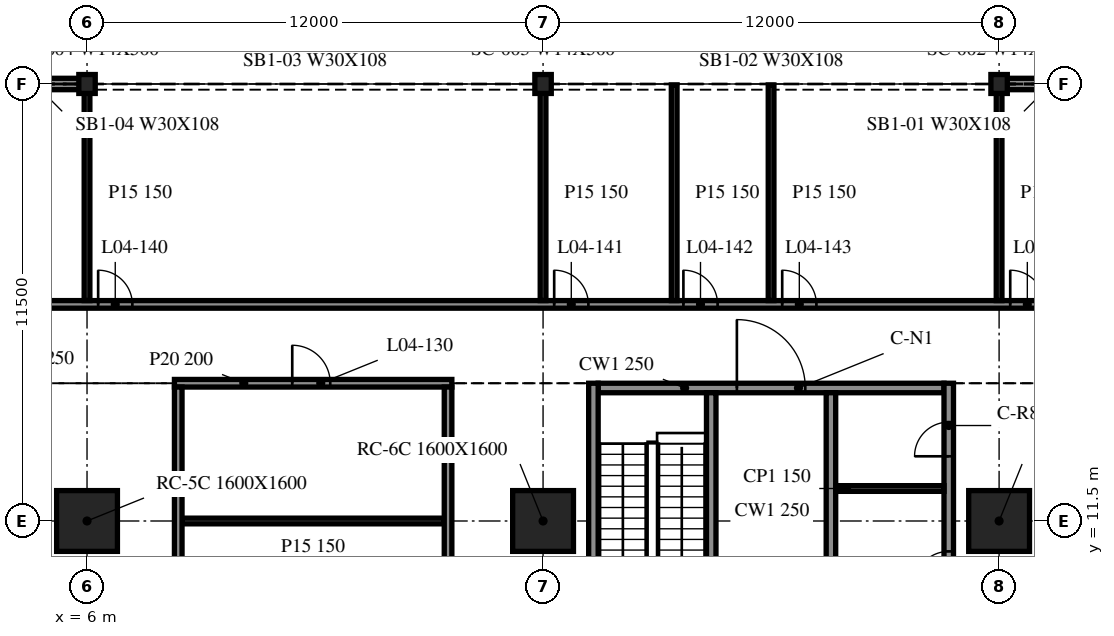
"""IFC4 building model, lengths in metres.
Left out: names, types, materials, properties, quantities, classifications, styles, units other than length and angle.
Written with IfcOpenShell. Run it as: python <this file> out.ifc"""

import sys

from ifc_helpers import new_model, si_unit, direction, frame, frame_2d, origin, origin_2d, place, context, subcontext, project, spatial, rectangle, i_section, extrude, element, fill, save


model = new_model("IFC4")
c1 = context("Model", 3, precision=1e-05, world=origin(), true_north=direction((0.0, 1.0)))
c2 = subcontext(c1, "Body", "Model", "MODEL_VIEW")
j1 = project(units=[si_unit("LENGTHUNIT", "METRE"), si_unit("PLANEANGLEUNIT", "RADIAN")], contexts=[c1])
p1 = place(None, origin())
s1 = spatial("IfcSite", under=j1, at=p1, CompositionType="ELEMENT")
p2 = place(p1, origin())
s2 = spatial("IfcBuilding", under=s1, at=p2, CompositionType="ELEMENT")
p3 = place(p2, frame((0.0, 0.0, 20.1)))
s3 = spatial("IfcBuildingStorey", under=s2, at=p3, CompositionType="ELEMENT", Elevation=20.1)
for number, where, z_axis, x_axis in (
    (1, (6.0, 11.5, -0.34), (0.0, 0.0, 1.0), (1.0, 0.0, 0.0)),
    (2, (18.0, 11.5, -0.34), (0.0, 0.0, 1.0), (1.0, 0.0, 0.0)),
    (3, (30.0, 11.5, -0.34), (0.0, 0.0, 1.0), (1.0, 0.0, 0.0)),
):
    element("IfcColumn", number, at=place(p3, frame(where, z_axis=z_axis, x_axis=x_axis)), inside=s3, PredefinedType="COLUMN", context=c2, shape_type="SweptSolid", body=[
        extrude(rectangle(XDim=1.6, YDim=1.6, at=origin_2d()), origin(), (0.0, 0.0, 1.0), 4.3),
    ])
for number, where, z_axis, x_axis in (
    (4, (30.0, 23.0, -0.34), (0.0, 0.0, 1.0), (1.0, 0.0, 0.0)),
    (5, (18.0, 23.0, -0.34), (0.0, 0.0, 1.0), (1.0, 0.0, 0.0)),
    (6, (6.0, 23.0, -0.34), (0.0, 0.0, 1.0), (1.0, 0.0, 0.0)),
):
    element("IfcColumn", number, at=place(p3, frame(where, z_axis=z_axis, x_axis=x_axis)), inside=s3, PredefinedType="COLUMN", context=c2, shape_type="SweptSolid", body=[
        extrude(i_section(OverallWidth=0.432, OverallDepth=0.498, WebThickness=0.056, FlangeThickness=0.089, at=origin_2d()), origin(), (0.0, 0.0, 1.0), 4.3),
    ])
for number, where, z_axis, x_axis in (
    (7, (41.972, 23.0, 0.0), (0.0, 0.0, 1.0), (-1.0, 0.0, 0.0)),
    (8, (5.972, 23.0, 0.0), (0.0, 0.0, 1.0), (-1.0, 0.0, 0.0)),
):
    element("IfcWall", number, at=place(p3, frame(where, z_axis=z_axis, x_axis=x_axis)), inside=s3, PredefinedType="NOTDEFINED", context=c2, shape_type="SweptSolid", body=[
        extrude(rectangle(XDim=11.944, YDim=0.3, at=frame_2d((5.972, 0.0))), origin(), (0.0, 0.0, 1.0), 3.203),
    ])
p4 = place(p3, frame((19.325, 15.125, 0.0), z_axis=(0.0, 0.0, 1.0), x_axis=(0.0, -1.0, 0.0)))
e9 = element("IfcWall", 9, at=p4, inside=s3, PredefinedType="SOLIDWALL", context=c2, shape_type="SweptSolid", body=[
    extrude(rectangle(XDim=24.25, YDim=0.25, at=frame_2d((12.125, 0.0))), origin(), (0.0, 0.0, 1.0), 3.96),
])
p5 = place(p3, frame((28.675, -9.125, 0.0), z_axis=(0.0, 0.0, 1.0), x_axis=(0.0, 1.0, 0.0)))
e10 = element("IfcWall", 10, at=p5, inside=s3, PredefinedType="SOLIDWALL", context=c2, shape_type="SweptSolid", body=[
    extrude(rectangle(XDim=24.25, YDim=0.25, at=frame_2d((12.125, 0.0))), origin(), (0.0, 0.0, 1.0), 3.96),
])
p6 = place(p5, frame((13.075, 0.0, 0.0)))
e11 = element("IfcOpeningElement", 11, at=p6, cuts=e10, PredefinedType="OPENING", context=c2, shape_type="SweptSolid", body=[
    extrude(rectangle(XDim=0.9, YDim=2.1, at=frame_2d((0.45, 1.05))), frame((0.0, 0.135, 0.0), z_axis=(0.0, -1.0, 0.0), x_axis=(1.0, 0.0, 0.0)), (0.0, 0.0, 1.0), 0.27),
])
p7 = place(p5, frame((15.775, 0.0, 0.0)))
e12 = element("IfcOpeningElement", 12, at=p7, cuts=e10, PredefinedType="OPENING", context=c2, shape_type="SweptSolid", body=[
    extrude(rectangle(XDim=0.9, YDim=2.1, at=frame_2d((0.45, 1.05))), frame((0.0, 0.135, 0.0), z_axis=(0.0, -1.0, 0.0), x_axis=(1.0, 0.0, 0.0)), (0.0, 0.0, 1.0), 0.27),
])
p8 = place(p5, frame((18.925, 0.0, 0.0)))
e13 = element("IfcOpeningElement", 13, at=p8, cuts=e10, PredefinedType="OPENING", context=c2, shape_type="SweptSolid", body=[
    extrude(rectangle(XDim=0.9, YDim=2.1, at=frame_2d((0.45, 1.05))), frame((0.0, 0.135, 0.0), z_axis=(0.0, -1.0, 0.0), x_axis=(1.0, 0.0, 0.0)), (0.0, 0.0, 1.0), 0.27),
])
p9 = place(p5, frame((22.327, 0.0, 0.0)))
e14 = element("IfcOpeningElement", 14, at=p9, cuts=e10, PredefinedType="OPENING", context=c2, shape_type="SweptSolid", body=[
    extrude(rectangle(XDim=0.9, YDim=2.1, at=frame_2d((0.45, 1.05))), frame((0.0, 0.135, 0.0), z_axis=(0.0, -1.0, 0.0), x_axis=(1.0, 0.0, 0.0)), (0.0, 0.0, 1.0), 0.27),
])
p10 = place(p3, frame((19.45, 15.0, 0.0), z_axis=(0.0, 0.0, 1.0), x_axis=(1.0, 0.0, 0.0)))
e15 = element("IfcWall", 15, at=p10, inside=s3, PredefinedType="SOLIDWALL", context=c2, shape_type="SweptSolid", body=[
    extrude(rectangle(XDim=9.1, YDim=0.25, at=frame_2d((4.55, 0.0))), origin(), (0.0, 0.0, 1.0), 3.96),
])
p11 = place(p10, frame((3.65, 0.0, 0.0)))
e16 = element("IfcOpeningElement", 16, at=p11, cuts=e15, PredefinedType="OPENING", context=c2, shape_type="SweptSolid", body=[
    extrude(rectangle(XDim=1.8, YDim=2.1, at=frame_2d((0.9, 1.05))), frame((0.0, 0.135, 0.0), z_axis=(0.0, -1.0, 0.0), x_axis=(1.0, 0.0, 0.0)), (0.0, 0.0, 1.0), 0.27),
])
p12 = place(p3, frame((22.425, 14.875, 0.0), z_axis=(0.0, 0.0, 1.0), x_axis=(0.0, -1.0, 0.0)))
e17 = element("IfcWall", 17, at=p12, inside=s3, PredefinedType="SOLIDWALL", context=c2, shape_type="SweptSolid", body=[
    extrude(rectangle(XDim=6.25, YDim=0.25, at=frame_2d((3.125, 0.0))), origin(), (0.0, 0.0, 1.0), 3.96),
])
p13 = place(p12, frame((4.85, 0.0, 0.0)))
e18 = element("IfcOpeningElement", 18, at=p13, cuts=e17, PredefinedType="OPENING", context=c2, shape_type="SweptSolid", body=[
    extrude(rectangle(XDim=1.0, YDim=2.1, at=frame_2d((0.5, 1.05))), frame((0.0, 0.135, 0.0), z_axis=(0.0, -1.0, 0.0), x_axis=(1.0, 0.0, 0.0)), (0.0, 0.0, 1.0), 0.27),
])
p14 = place(p3, frame((25.575, 14.875, 0.0), z_axis=(0.0, 0.0, 1.0), x_axis=(0.0, -1.0, 0.0)))
e19 = element("IfcWall", 19, at=p14, inside=s3, PredefinedType="SOLIDWALL", context=c2, shape_type="SweptSolid", body=[
    extrude(rectangle(XDim=17.5, YDim=0.25, at=frame_2d((8.75, 0.0))), origin(), (0.0, 0.0, 1.0), 3.96),
])
p15 = place(p14, frame((15.45, 0.0, 0.0)))
e20 = element("IfcOpeningElement", 20, at=p15, cuts=e19, PredefinedType="OPENING", context=c2, shape_type="SweptSolid", body=[
    extrude(rectangle(XDim=1.1, YDim=2.1, at=frame_2d((0.55, 1.05))), frame((0.0, 0.135, 0.0), z_axis=(0.0, -1.0, 0.0), x_axis=(1.0, 0.0, 0.0)), (0.0, 0.0, 1.0), 0.27),
])
p16 = place(p14, frame((12.8, 0.0, 0.0)))
e21 = element("IfcOpeningElement", 21, at=p16, cuts=e19, PredefinedType="OPENING", context=c2, shape_type="SweptSolid", body=[
    extrude(rectangle(XDim=0.9, YDim=2.1, at=frame_2d((0.45, 1.05))), frame((0.0, 0.135, 0.0), z_axis=(0.0, -1.0, 0.0), x_axis=(1.0, 0.0, 0.0)), (0.0, 0.0, 1.0), 0.27),
])
p17 = place(p3, frame((25.7, 12.355, 0.0), z_axis=(0.0, 0.0, 1.0), x_axis=(1.0, 0.0, 0.0)))
e22 = element("IfcWall", 22, at=p17, inside=s3, PredefinedType="PARTITIONING", context=c2, shape_type="SweptSolid", body=[
    extrude(rectangle(XDim=2.85, YDim=0.15, at=frame_2d((1.425, 0.0))), origin(), (0.0, 0.0, 1.0), 3.96),
])
p18 = place(p3, frame((8.5, 11.5, 0.0), z_axis=(0.0, 0.0, 1.0), x_axis=(1.0, 0.0, 0.0)))
e23 = element("IfcWall", 23, at=p18, inside=s3, PredefinedType="PARTITIONING", context=c2, shape_type="SweptSolid", body=[
    extrude(rectangle(XDim=6.9, YDim=0.15, at=frame_2d((3.45, 0.0))), origin(), (0.0, 0.0, 1.0), 3.96),
])
p19 = place(p3, frame((8.3, 15.125, 0.0), z_axis=(0.0, 0.0, 1.0), x_axis=(1.0, 0.0, 0.0)))
e24 = element("IfcWall", 24, at=p19, inside=s3, PredefinedType="PARTITIONING", context=c2, shape_type="SweptSolid", body=[
    extrude(rectangle(XDim=7.3, YDim=0.2, at=frame_2d((3.65, 0.0))), origin(), (0.0, 0.0, 1.0), 3.96),
])
p20 = place(p19, frame((3.1, 0.0, 0.0)))
e25 = element("IfcOpeningElement", 25, at=p20, cuts=e24, PredefinedType="OPENING", context=c2, shape_type="SweptSolid", body=[
    extrude(rectangle(XDim=1.0, YDim=2.1, at=frame_2d((0.5, 1.05))), frame((0.0, 0.11, 0.0), z_axis=(0.0, -1.0, 0.0), x_axis=(1.0, 0.0, 0.0)), (0.0, 0.0, 1.0), 0.22),
])
p21 = place(p3, frame((-47.807, 17.2, 0.0), z_axis=(0.0, 0.0, 1.0), x_axis=(1.0, 0.0, 0.0)))
e26 = element("IfcWall", 26, at=p21, inside=s3, PredefinedType="PARTITIONING", context=c2, shape_type="SweptSolid", body=[
    extrude(rectangle(XDim=95.615, YDim=0.2, at=frame_2d((47.807, 0.0))), origin(), (0.0, 0.0, 1.0), 3.96),
])
p22 = place(p21, frame((4.7, 0.0, 0.0)))
e27 = element("IfcOpeningElement", 27, at=p22, cuts=e26, PredefinedType="OPENING", context=c2, shape_type="SweptSolid", body=[
    extrude(rectangle(XDim=0.9, YDim=2.1, at=frame_2d((0.45, 1.05))), frame((0.0, 0.11, 0.0), z_axis=(0.0, -1.0, 0.0), x_axis=(1.0, 0.0, 0.0)), (0.0, 0.0, 1.0), 0.22),
])
p23 = place(p21, frame((16.7, 0.0, 0.0)))
e28 = element("IfcOpeningElement", 28, at=p23, cuts=e26, PredefinedType="OPENING", context=c2, shape_type="SweptSolid", body=[
    extrude(rectangle(XDim=0.9, YDim=2.1, at=frame_2d((0.45, 1.05))), frame((0.0, 0.11, 0.0), z_axis=(0.0, -1.0, 0.0), x_axis=(1.0, 0.0, 0.0)), (0.0, 0.0, 1.0), 0.22),
])
p24 = place(p21, frame((20.1, 0.0, 0.0)))
e29 = element("IfcOpeningElement", 29, at=p24, cuts=e26, PredefinedType="OPENING", context=c2, shape_type="SweptSolid", body=[
    extrude(rectangle(XDim=0.9, YDim=2.1, at=frame_2d((0.45, 1.05))), frame((0.0, 0.11, 0.0), z_axis=(0.0, -1.0, 0.0), x_axis=(1.0, 0.0, 0.0)), (0.0, 0.0, 1.0), 0.22),
])
p25 = place(p21, frame((22.7, 0.0, 0.0)))
e30 = element("IfcOpeningElement", 30, at=p25, cuts=e26, PredefinedType="OPENING", context=c2, shape_type="SweptSolid", body=[
    extrude(rectangle(XDim=0.9, YDim=2.1, at=frame_2d((0.45, 1.05))), frame((0.0, 0.11, 0.0), z_axis=(0.0, -1.0, 0.0), x_axis=(1.0, 0.0, 0.0)), (0.0, 0.0, 1.0), 0.22),
])
p26 = place(p21, frame((28.7, 0.0, 0.0)))
e31 = element("IfcOpeningElement", 31, at=p26, cuts=e26, PredefinedType="OPENING", context=c2, shape_type="SweptSolid", body=[
    extrude(rectangle(XDim=0.9, YDim=2.1, at=frame_2d((0.45, 1.05))), frame((0.0, 0.11, 0.0), z_axis=(0.0, -1.0, 0.0), x_axis=(1.0, 0.0, 0.0)), (0.0, 0.0, 1.0), 0.22),
])
p27 = place(p21, frame((40.7, 0.0, 0.0)))
e32 = element("IfcOpeningElement", 32, at=p27, cuts=e26, PredefinedType="OPENING", context=c2, shape_type="SweptSolid", body=[
    extrude(rectangle(XDim=0.9, YDim=2.1, at=frame_2d((0.45, 1.05))), frame((0.0, 0.11, 0.0), z_axis=(0.0, -1.0, 0.0), x_axis=(1.0, 0.0, 0.0)), (0.0, 0.0, 1.0), 0.22),
])
p28 = place(p21, frame((44.1, 0.0, 0.0)))
e33 = element("IfcOpeningElement", 33, at=p28, cuts=e26, PredefinedType="OPENING", context=c2, shape_type="SweptSolid", body=[
    extrude(rectangle(XDim=0.9, YDim=2.1, at=frame_2d((0.45, 1.05))), frame((0.0, 0.11, 0.0), z_axis=(0.0, -1.0, 0.0), x_axis=(1.0, 0.0, 0.0)), (0.0, 0.0, 1.0), 0.22),
])
p29 = place(p21, frame((46.7, 0.0, 0.0)))
e34 = element("IfcOpeningElement", 34, at=p29, cuts=e26, PredefinedType="OPENING", context=c2, shape_type="SweptSolid", body=[
    extrude(rectangle(XDim=0.9, YDim=2.1, at=frame_2d((0.45, 1.05))), frame((0.0, 0.11, 0.0), z_axis=(0.0, -1.0, 0.0), x_axis=(1.0, 0.0, 0.0)), (0.0, 0.0, 1.0), 0.22),
])
p30 = place(p21, frame((48.1, 0.0, 0.0)))
e35 = element("IfcOpeningElement", 35, at=p30, cuts=e26, PredefinedType="OPENING", context=c2, shape_type="SweptSolid", body=[
    extrude(rectangle(XDim=0.9, YDim=2.1, at=frame_2d((0.45, 1.05))), frame((0.0, 0.11, 0.0), z_axis=(0.0, -1.0, 0.0), x_axis=(1.0, 0.0, 0.0)), (0.0, 0.0, 1.0), 0.22),
])
p31 = place(p21, frame((54.1, 0.0, 0.0)))
e36 = element("IfcOpeningElement", 36, at=p31, cuts=e26, PredefinedType="OPENING", context=c2, shape_type="SweptSolid", body=[
    extrude(rectangle(XDim=0.9, YDim=2.1, at=frame_2d((0.45, 1.05))), frame((0.0, 0.11, 0.0), z_axis=(0.0, -1.0, 0.0), x_axis=(1.0, 0.0, 0.0)), (0.0, 0.0, 1.0), 0.22),
])
p32 = place(p21, frame((66.1, 0.0, 0.0)))
e37 = element("IfcOpeningElement", 37, at=p32, cuts=e26, PredefinedType="OPENING", context=c2, shape_type="SweptSolid", body=[
    extrude(rectangle(XDim=0.9, YDim=2.1, at=frame_2d((0.45, 1.05))), frame((0.0, 0.11, 0.0), z_axis=(0.0, -1.0, 0.0), x_axis=(1.0, 0.0, 0.0)), (0.0, 0.0, 1.0), 0.22),
])
p33 = place(p21, frame((69.5, 0.0, 0.0)))
e38 = element("IfcOpeningElement", 38, at=p33, cuts=e26, PredefinedType="OPENING", context=c2, shape_type="SweptSolid", body=[
    extrude(rectangle(XDim=0.9, YDim=2.1, at=frame_2d((0.45, 1.05))), frame((0.0, 0.11, 0.0), z_axis=(0.0, -1.0, 0.0), x_axis=(1.0, 0.0, 0.0)), (0.0, 0.0, 1.0), 0.22),
])
p34 = place(p21, frame((72.1, 0.0, 0.0)))
e39 = element("IfcOpeningElement", 39, at=p34, cuts=e26, PredefinedType="OPENING", context=c2, shape_type="SweptSolid", body=[
    extrude(rectangle(XDim=0.9, YDim=2.1, at=frame_2d((0.45, 1.05))), frame((0.0, 0.11, 0.0), z_axis=(0.0, -1.0, 0.0), x_axis=(1.0, 0.0, 0.0)), (0.0, 0.0, 1.0), 0.22),
])
p35 = place(p21, frame((78.1, 0.0, 0.0)))
e40 = element("IfcOpeningElement", 40, at=p35, cuts=e26, PredefinedType="OPENING", context=c2, shape_type="SweptSolid", body=[
    extrude(rectangle(XDim=0.9, YDim=2.1, at=frame_2d((0.45, 1.05))), frame((0.0, 0.11, 0.0), z_axis=(0.0, -1.0, 0.0), x_axis=(1.0, 0.0, 0.0)), (0.0, 0.0, 1.0), 0.22),
])
p36 = place(p21, frame((90.1, 0.0, 0.0)))
e41 = element("IfcOpeningElement", 41, at=p36, cuts=e26, PredefinedType="OPENING", context=c2, shape_type="SweptSolid", body=[
    extrude(rectangle(XDim=0.9, YDim=2.1, at=frame_2d((0.45, 1.05))), frame((0.0, 0.11, 0.0), z_axis=(0.0, -1.0, 0.0), x_axis=(1.0, 0.0, 0.0)), (0.0, 0.0, 1.0), 0.22),
])
p37 = place(p3, frame((6.0, 17.3, 0.0), z_axis=(0.0, 0.0, 1.0), x_axis=(0.0, 1.0, 0.0)))
e42 = element("IfcWall", 42, at=p37, inside=s3, PredefinedType="PARTITIONING", context=c2, shape_type="SweptSolid", body=[
    extrude(rectangle(XDim=5.675, YDim=0.15, at=frame_2d((2.837, 0.0))), origin(), (0.0, 0.0, 1.0), 3.96),
])
p38 = place(p3, frame((8.4, -9.025, 0.0), z_axis=(0.0, 0.0, 1.0), x_axis=(0.0, 1.0, 0.0)))
e43 = element("IfcWall", 43, at=p38, inside=s3, PredefinedType="PARTITIONING", context=c2, shape_type="SweptSolid", body=[
    extrude(rectangle(XDim=24.05, YDim=0.2, at=frame_2d((12.025, 0.0))), origin(), (0.0, 0.0, 1.0), 3.96),
])
p39 = place(p38, frame((11.5, 0.0, 0.0)))
e44 = element("IfcOpeningElement", 44, at=p39, cuts=e43, PredefinedType="OPENING", context=c2, shape_type="SweptSolid", body=[
    extrude(rectangle(XDim=1.0, YDim=2.1, at=frame_2d((0.5, 1.05))), frame((0.0, 0.11, 0.0), z_axis=(0.0, -1.0, 0.0), x_axis=(1.0, 0.0, 0.0)), (0.0, 0.0, 1.0), 0.22),
])
p40 = place(p3, frame((15.5, -9.025, 0.0), z_axis=(0.0, 0.0, 1.0), x_axis=(0.0, 1.0, 0.0)))
e45 = element("IfcWall", 45, at=p40, inside=s3, PredefinedType="PARTITIONING", context=c2, shape_type="SweptSolid", body=[
    extrude(rectangle(XDim=24.05, YDim=0.2, at=frame_2d((12.025, 0.0))), origin(), (0.0, 0.0, 1.0), 3.96),
])
for number, where, z_axis, x_axis in (
    (46, (18.0, 17.3, 0.0), (0.0, 0.0, 1.0), (0.0, 1.0, 0.0)),
    (47, (21.45, 17.3, 0.0), (0.0, 0.0, 1.0), (0.0, 1.0, 0.0)),
    (48, (24.0, 17.3, 0.0), (0.0, 0.0, 1.0), (0.0, 1.0, 0.0)),
    (49, (30.0, 17.3, 0.0), (0.0, 0.0, 1.0), (0.0, 1.0, 0.0)),
):
    element("IfcWall", number, at=place(p3, frame(where, z_axis=z_axis, x_axis=x_axis)), inside=s3, PredefinedType="PARTITIONING", context=c2, shape_type="SweptSolid", body=[
        extrude(rectangle(XDim=5.675, YDim=0.15, at=frame_2d((2.837, 0.0))), origin(), (0.0, 0.0, 1.0), 3.96),
    ])
p41 = place(p11, origin())
e50 = element("IfcDoor", 50, at=p41, inside=s3, OperationType="DOUBLE_DOOR_SINGLE_SWING", PredefinedType="DOOR", context=c2, shape_type="SweptSolid", body=[
    extrude(rectangle(XDim=1.8, YDim=2.1, at=frame_2d((0.9, 1.05))), frame((0.0, 0.025, 0.0), z_axis=(0.0, -1.0, 0.0), x_axis=(1.0, 0.0, 0.0)), (0.0, 0.0, 1.0), 0.05),
])
fill(e16, e50)
p42 = place(p8, origin())
e51 = element("IfcDoor", 51, at=p42, inside=s3, OperationType="SINGLE_SWING_LEFT", PredefinedType="DOOR", context=c2, shape_type="SweptSolid", body=[
    extrude(rectangle(XDim=0.9, YDim=2.1, at=frame_2d((0.45, 1.05))), frame((0.0, 0.025, 0.0), z_axis=(0.0, -1.0, 0.0), x_axis=(1.0, 0.0, 0.0)), (0.0, 0.0, 1.0), 0.05),
])
fill(e13, e51)
p43 = place(p9, origin())
e52 = element("IfcDoor", 52, at=p43, inside=s3, OperationType="SINGLE_SWING_RIGHT", PredefinedType="DOOR", context=c2, shape_type="SweptSolid", body=[
    extrude(rectangle(XDim=0.9, YDim=2.1, at=frame_2d((0.45, 1.05))), frame((0.0, 0.025, 0.0), z_axis=(0.0, -1.0, 0.0), x_axis=(1.0, 0.0, 0.0)), (0.0, 0.0, 1.0), 0.05),
])
fill(e14, e52)
p44 = place(p20, origin())
e53 = element("IfcDoor", 53, at=p44, inside=s3, OperationType="SINGLE_SWING_RIGHT", PredefinedType="DOOR", context=c2, shape_type="SweptSolid", body=[
    extrude(rectangle(XDim=1.0, YDim=2.1, at=frame_2d((0.5, 1.05))), frame((0.0, 0.025, 0.0), z_axis=(0.0, -1.0, 0.0), x_axis=(1.0, 0.0, 0.0)), (0.0, 0.0, 1.0), 0.05),
])
fill(e25, e53)
p45 = place(p31, origin())
e54 = element("IfcDoor", 54, at=p45, inside=s3, OperationType="SINGLE_SWING_RIGHT", PredefinedType="DOOR", context=c2, shape_type="SweptSolid", body=[
    extrude(rectangle(XDim=0.9, YDim=2.1, at=frame_2d((0.45, 1.05))), frame((0.0, 0.025, 0.0), z_axis=(0.0, -1.0, 0.0), x_axis=(1.0, 0.0, 0.0)), (0.0, 0.0, 1.0), 0.05),
])
fill(e36, e54)
p46 = place(p32, origin())
e55 = element("IfcDoor", 55, at=p46, inside=s3, OperationType="SINGLE_SWING_RIGHT", PredefinedType="DOOR", context=c2, shape_type="SweptSolid", body=[
    extrude(rectangle(XDim=0.9, YDim=2.1, at=frame_2d((0.45, 1.05))), frame((0.0, 0.025, 0.0), z_axis=(0.0, -1.0, 0.0), x_axis=(1.0, 0.0, 0.0)), (0.0, 0.0, 1.0), 0.05),
])
fill(e37, e55)
p47 = place(p33, origin())
e56 = element("IfcDoor", 56, at=p47, inside=s3, OperationType="SINGLE_SWING_RIGHT", PredefinedType="DOOR", context=c2, shape_type="SweptSolid", body=[
    extrude(rectangle(XDim=0.9, YDim=2.1, at=frame_2d((0.45, 1.05))), frame((0.0, 0.025, 0.0), z_axis=(0.0, -1.0, 0.0), x_axis=(1.0, 0.0, 0.0)), (0.0, 0.0, 1.0), 0.05),
])
fill(e38, e56)
p48 = place(p34, origin())
e57 = element("IfcDoor", 57, at=p48, inside=s3, OperationType="SINGLE_SWING_RIGHT", PredefinedType="DOOR", context=c2, shape_type="SweptSolid", body=[
    extrude(rectangle(XDim=0.9, YDim=2.1, at=frame_2d((0.45, 1.05))), frame((0.0, 0.025, 0.0), z_axis=(0.0, -1.0, 0.0), x_axis=(1.0, 0.0, 0.0)), (0.0, 0.0, 1.0), 0.05),
])
fill(e39, e57)
p49 = place(p35, origin())
e58 = element("IfcDoor", 58, at=p49, inside=s3, OperationType="SINGLE_SWING_RIGHT", PredefinedType="DOOR", context=c2, shape_type="SweptSolid", body=[
    extrude(rectangle(XDim=0.9, YDim=2.1, at=frame_2d((0.45, 1.05))), frame((0.0, 0.025, 0.0), z_axis=(0.0, -1.0, 0.0), x_axis=(1.0, 0.0, 0.0)), (0.0, 0.0, 1.0), 0.05),
])
fill(e40, e58)
save(model, sys.argv[1])
